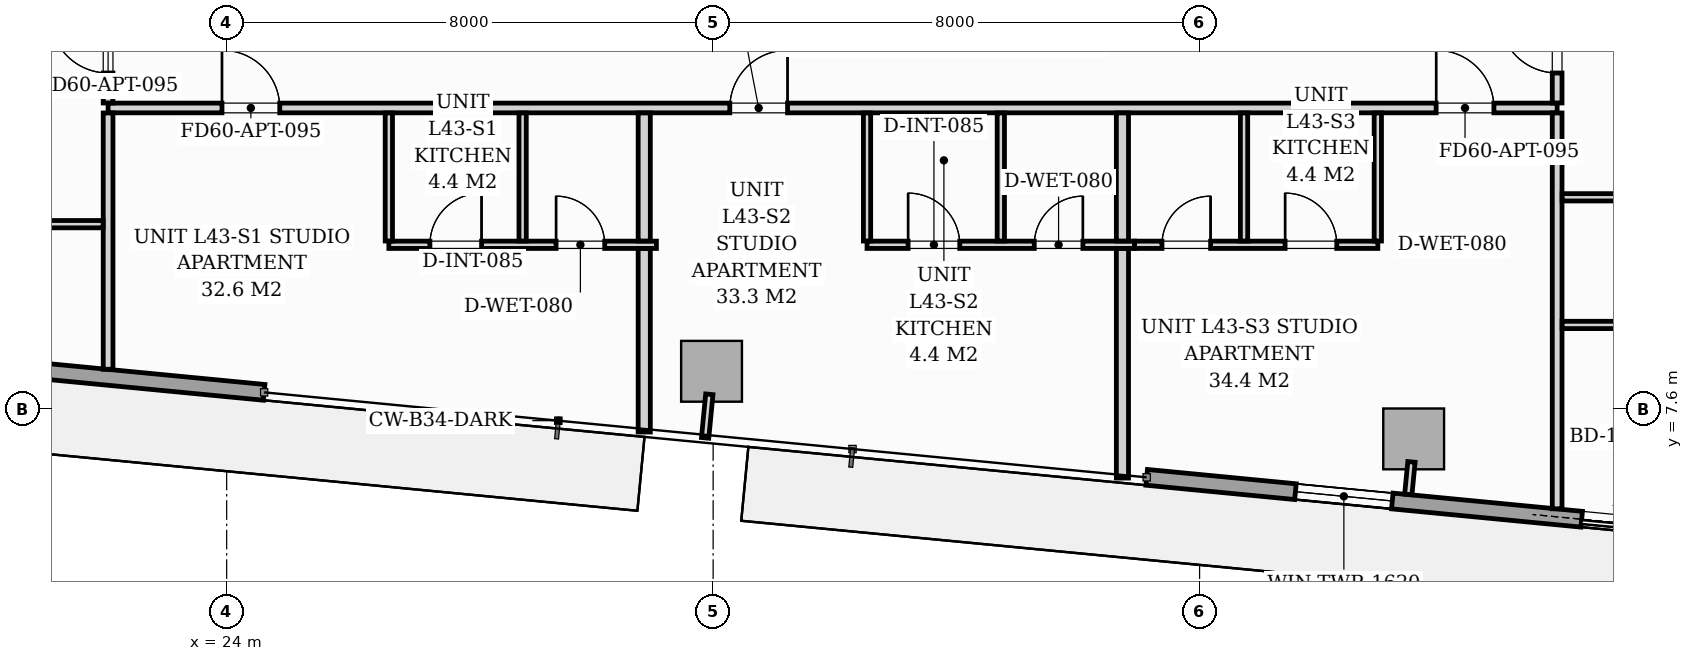
"""IFC4 building model, lengths in metres.
Left out: names, types, materials, properties, quantities, classifications, styles, units other than length and angle.
Written with IfcOpenShell. Run it as: python <this file> out.ifc"""

import sys

from ifc_helpers import new_model, si_unit, direction, frame, frame_2d, origin, origin_2d, place, context, subcontext, project, spatial, rectangle, extrude, source, transform, mapped, element, fill, save


model = new_model("IFC4")
c1 = context("Model", 3, precision=1e-05, world=origin(), true_north=direction((0.0, 1.0)))
c2 = subcontext(c1, "Body", "Model", "MODEL_VIEW")
j1 = project(units=[si_unit("LENGTHUNIT", "METRE"), si_unit("PLANEANGLEUNIT", "RADIAN")], contexts=[c1])
p1 = place(None, origin())
s1 = spatial("IfcSite", under=j1, at=p1, CompositionType="ELEMENT")
p2 = place(p1, origin())
s2 = spatial("IfcBuilding", under=s1, at=p2, CompositionType="ELEMENT")
p3 = place(p2, frame((0.0, 0.0, 150.2)))
s3 = spatial("IfcBuildingStorey", under=s2, at=p3, CompositionType="ELEMENT", Elevation=150.2)
m1 = source(origin(), c2, "Body", "SweptSolid", [
    extrude(rectangle(XDim=1.0, YDim=1.0, at=origin_2d()), origin(), (0.0, 0.0, 1.0), 3.196),
])
for number, where, z_axis, x_axis in (
    (1, (31.974, 8.22, 0.002), (0.0, 0.0, 1.0), (0.995, -0.096, 0.0)),
    (2, (43.521, 7.108, 0.002), (0.0, 0.0, 1.0), (0.995, -0.096, 0.0)),
):
    element("IfcColumn", number, at=place(p3, frame(where, z_axis=z_axis, x_axis=x_axis)), inside=s3, PredefinedType="COLUMN", context=c2, shape_type="MappedRepresentation", body=[
        mapped(m1, transform((0.0, 0.0, 0.0), scale=1.0)),
    ])
p4 = place(p3, frame((56.061, 4.845, 0.0), z_axis=(0.0, 0.0, 1.0), x_axis=(-0.995395976631, 0.095848055311, 0.0)))
e3 = element("IfcWall", 3, at=p4, inside=s3, PredefinedType="STANDARD", context=c2, shape_type="SweptSolid", body=[
    extrude(rectangle(XDim=17.01, YDim=0.26, at=frame_2d((8.505, 0.0))), origin(), (0.0, 0.0, 1.0), 2.94),
])
p5 = place(p4, frame((8.023, 0.0, 0.0)))
e4 = element("IfcOpeningElement", 4, at=p5, cuts=e3, PredefinedType="OPENING", context=c2, shape_type="SweptSolid", body=[
    extrude(rectangle(XDim=1.8, YDim=2.06, at=frame_2d((0.9, 1.03))), frame((0.0, 0.14, 0.0), z_axis=(0.0, -1.0, 0.0), x_axis=(1.0, 0.0, 0.0)), (0.0, 0.0, 1.0), 0.28),
])
p6 = place(p4, frame((2.05, 0.0, 0.65)))
e5 = element("IfcOpeningElement", 5, at=p6, cuts=e3, PredefinedType="OPENING", context=c2, shape_type="SweptSolid", body=[
    extrude(rectangle(XDim=1.6, YDim=1.5, at=frame_2d((0.8, 0.75))), frame((0.0, 0.14, 0.0), z_axis=(0.0, -1.0, 0.0), x_axis=(1.0, 0.0, 0.0)), (0.0, 0.0, 1.0), 0.28),
])
p7 = place(p4, frame((12.952, 0.0, 0.75)))
e6 = element("IfcOpeningElement", 6, at=p7, cuts=e3, PredefinedType="OPENING", context=c2, shape_type="SweptSolid", body=[
    extrude(rectangle(XDim=1.6, YDim=1.5, at=frame_2d((0.8, 0.75))), frame((0.0, 0.14, 0.0), z_axis=(0.0, -1.0, 0.0), x_axis=(1.0, 0.0, 0.0)), (0.0, 0.0, 1.0), 0.28),
])
p8 = place(p3, frame((24.617, 7.873, 0.0), z_axis=(0.0, 0.0, 1.0), x_axis=(-0.995395976631, 0.095848055311, 0.0)))
e7 = element("IfcWall", 7, at=p8, inside=s3, PredefinedType="STANDARD", context=c2, shape_type="SweptSolid", body=[
    extrude(rectangle(XDim=17.01, YDim=0.26, at=frame_2d((8.505, 0.0))), origin(), (0.0, 0.0, 1.0), 2.94),
])
p9 = place(p8, frame((6.65, 0.0, 0.0)))
e8 = element("IfcOpeningElement", 8, at=p9, cuts=e7, PredefinedType="OPENING", context=c2, shape_type="SweptSolid", body=[
    extrude(rectangle(XDim=1.8, YDim=2.06, at=frame_2d((0.9, 1.03))), frame((0.0, 0.14, 0.0), z_axis=(0.0, -1.0, 0.0), x_axis=(1.0, 0.0, 0.0)), (0.0, 0.0, 1.0), 0.28),
])
p10 = place(p8, frame((9.25, 0.0, 0.65)))
e9 = element("IfcOpeningElement", 9, at=p10, cuts=e7, PredefinedType="OPENING", context=c2, shape_type="SweptSolid", body=[
    extrude(rectangle(XDim=1.6, YDim=1.5, at=frame_2d((0.8, 0.75))), frame((0.0, 0.14, 0.0), z_axis=(0.0, -1.0, 0.0), x_axis=(1.0, 0.0, 0.0)), (0.0, 0.0, 1.0), 0.28),
])
p11 = place(p3, frame((22.05, 12.55, 0.0), z_axis=(0.0, 0.0, 1.0), x_axis=(1.0, 0.0, 0.0)))
e10 = element("IfcWall", 10, at=p11, inside=s3, PredefinedType="PARTITIONING", context=c2, shape_type="SweptSolid", body=[
    extrude(rectangle(XDim=23.83, YDim=0.16, at=frame_2d((11.915, 0.0))), origin(), (0.0, 0.0, 1.0), 2.94),
])
p12 = place(p11, frame((1.873, 0.0, 0.0)))
e11 = element("IfcOpeningElement", 11, at=p12, cuts=e10, PredefinedType="OPENING", context=c2, shape_type="SweptSolid", body=[
    extrude(rectangle(XDim=0.95, YDim=2.06, at=frame_2d((0.475, 1.03))), frame((0.0, 0.09, 0.0), z_axis=(0.0, -1.0, 0.0), x_axis=(1.0, 0.0, 0.0)), (0.0, 0.0, 1.0), 0.18),
])
p13 = place(p11, frame((10.224, 0.0, 0.0)))
e12 = element("IfcOpeningElement", 12, at=p13, cuts=e10, PredefinedType="OPENING", context=c2, shape_type="SweptSolid", body=[
    extrude(rectangle(XDim=0.95, YDim=2.06, at=frame_2d((0.475, 1.03))), frame((0.0, 0.09, 0.0), z_axis=(0.0, -1.0, 0.0), x_axis=(1.0, 0.0, 0.0)), (0.0, 0.0, 1.0), 0.18),
])
p14 = place(p11, frame((21.84, 0.0, 0.0)))
e13 = element("IfcOpeningElement", 13, at=p14, cuts=e10, PredefinedType="OPENING", context=c2, shape_type="SweptSolid", body=[
    extrude(rectangle(XDim=0.95, YDim=2.06, at=frame_2d((0.475, 1.03))), frame((0.0, 0.09, 0.0), z_axis=(0.0, -1.0, 0.0), x_axis=(1.0, 0.0, 0.0)), (0.0, 0.0, 1.0), 0.18),
])
p15 = place(p3, frame((22.05, 8.253, 0.0), z_axis=(0.0, 0.0, 1.0), x_axis=(0.0, 1.0, 0.0)))
e14 = element("IfcWall", 14, at=p15, inside=s3, PredefinedType="PARTITIONING", context=c2, shape_type="SweptSolid", body=[
    extrude(rectangle(XDim=4.215, YDim=0.16, at=frame_2d((2.107, 0.0))), origin(), (0.0, 0.0, 1.0), 2.94),
])
p16 = place(p3, frame((22.05, 12.632, 0.0), z_axis=(0.0, 0.0, 1.0), x_axis=(0.0, 1.0, 0.0)))
e15 = element("IfcWall", 15, at=p16, inside=s3, PredefinedType="PARTITIONING", context=c2, shape_type="SweptSolid", body=[
    extrude(rectangle(XDim=14.785, YDim=0.16, at=frame_2d((7.393, 0.0))), origin(), (0.0, 0.0, 1.0), 2.94),
])
p17 = place(p16, frame((0.493, 0.0, 0.0)))
e16 = element("IfcOpeningElement", 16, at=p17, cuts=e15, PredefinedType="OPENING", context=c2, shape_type="SweptSolid", body=[
    extrude(rectangle(XDim=0.95, YDim=2.06, at=frame_2d((0.475, 1.03))), frame((0.0, 0.09, 0.0), z_axis=(0.0, -1.0, 0.0), x_axis=(1.0, 0.0, 0.0)), (0.0, 0.0, 1.0), 0.18),
])
p18 = place(p3, frame((45.88, 5.958, 0.0), z_axis=(0.0, 0.0, 1.0), x_axis=(0.0, 1.0, 0.0)))
e17 = element("IfcWall", 17, at=p18, inside=s3, PredefinedType="PARTITIONING", context=c2, shape_type="SweptSolid", body=[
    extrude(rectangle(XDim=6.51, YDim=0.16, at=frame_2d((3.255, 0.0))), origin(), (0.0, 0.0, 1.0), 2.94),
])
p19 = place(p3, frame((45.88, 12.632, 0.0), z_axis=(0.0, 0.0, 1.0), x_axis=(0.0, 1.0, 0.0)))
e18 = element("IfcWall", 18, at=p19, inside=s3, PredefinedType="PARTITIONING", context=c2, shape_type="SweptSolid", body=[
    extrude(rectangle(XDim=4.466, YDim=0.16, at=frame_2d((2.233, 0.0))), origin(), (0.0, 0.0, 1.0), 2.94),
])
p20 = place(p19, frame((0.493, 0.0, 0.0)))
e19 = element("IfcOpeningElement", 19, at=p20, cuts=e18, PredefinedType="OPENING", context=c2, shape_type="SweptSolid", body=[
    extrude(rectangle(XDim=0.95, YDim=2.06, at=frame_2d((0.475, 1.03))), frame((0.0, 0.09, 0.0), z_axis=(0.0, -1.0, 0.0), x_axis=(1.0, 0.0, 0.0)), (0.0, 0.0, 1.0), 0.18),
])
p21 = place(p3, frame((26.667, 10.3, 0.0), z_axis=(0.0, 0.0, 1.0), x_axis=(1.0, 0.0, 0.0)))
e20 = element("IfcWall", 20, at=p21, inside=s3, PredefinedType="PARTITIONING", context=c2, shape_type="SweptSolid", body=[
    extrude(rectangle(XDim=4.4, YDim=0.12, at=frame_2d((2.2, 0.0))), origin(), (0.0, 0.0, 1.0), 2.94),
])
p22 = place(p21, frame((0.675, 0.0, 0.0)))
e21 = element("IfcOpeningElement", 21, at=p22, cuts=e20, PredefinedType="OPENING", context=c2, shape_type="SweptSolid", body=[
    extrude(rectangle(XDim=0.85, YDim=2.05, at=frame_2d((0.425, 1.025))), frame((0.0, 0.07, 0.0), z_axis=(0.0, -1.0, 0.0), x_axis=(1.0, 0.0, 0.0)), (0.0, 0.0, 1.0), 0.14),
])
p23 = place(p21, frame((2.75, 0.0, 0.0)))
e22 = element("IfcOpeningElement", 22, at=p23, cuts=e20, PredefinedType="OPENING", context=c2, shape_type="SweptSolid", body=[
    extrude(rectangle(XDim=0.8, YDim=2.02, at=frame_2d((0.4, 1.01))), frame((0.0, 0.07, 0.0), z_axis=(0.0, -1.0, 0.0), x_axis=(1.0, 0.0, 0.0)), (0.0, 0.0, 1.0), 0.14),
])
for number, where, z_axis, x_axis in (
    (23, (26.667, 10.362, 0.0), (0.0, 0.0, 1.0), (0.0, 1.0, 0.0)),
    (24, (28.867, 10.362, 0.0), (0.0, 0.0, 1.0), (0.0, 1.0, 0.0)),
):
    element("IfcWall", number, at=place(p3, frame(where, z_axis=z_axis, x_axis=x_axis)), inside=s3, PredefinedType="PARTITIONING", context=c2, shape_type="SweptSolid", body=[
        extrude(rectangle(XDim=2.106, YDim=0.12, at=frame_2d((1.053, 0.0))), origin(), (0.0, 0.0, 1.0), 2.94),
    ])
p24 = place(p3, frame((30.867, 7.221, 0.0), z_axis=(0.0, 0.0, 1.0), x_axis=(0.0, 1.0, 0.0)))
e25 = element("IfcWall", 25, at=p24, inside=s3, PredefinedType="PARTITIONING", context=c2, shape_type="SweptSolid", body=[
    extrude(rectangle(XDim=3.017, YDim=0.2, at=frame_2d((1.508, 0.0))), origin(), (0.0, 0.0, 1.0), 2.94),
])
p25 = place(p3, frame((30.867, 10.362, 0.0), z_axis=(0.0, 0.0, 1.0), x_axis=(0.0, 1.0, 0.0)))
e26 = element("IfcWall", 26, at=p25, inside=s3, PredefinedType="PARTITIONING", context=c2, shape_type="SweptSolid", body=[
    extrude(rectangle(XDim=2.106, YDim=0.2, at=frame_2d((1.053, 0.0))), origin(), (0.0, 0.0, 1.0), 2.94),
])
p26 = place(p3, frame((34.531, 10.3, 0.0), z_axis=(0.0, 0.0, 1.0), x_axis=(1.0, 0.0, 0.0)))
e27 = element("IfcWall", 27, at=p26, inside=s3, PredefinedType="PARTITIONING", context=c2, shape_type="SweptSolid", body=[
    extrude(rectangle(XDim=4.4, YDim=0.12, at=frame_2d((2.2, 0.0))), origin(), (0.0, 0.0, 1.0), 2.94),
])
p27 = place(p26, frame((0.675, 0.0, 0.0)))
e28 = element("IfcOpeningElement", 28, at=p27, cuts=e27, PredefinedType="OPENING", context=c2, shape_type="SweptSolid", body=[
    extrude(rectangle(XDim=0.85, YDim=2.05, at=frame_2d((0.425, 1.025))), frame((0.0, 0.07, 0.0), z_axis=(0.0, -1.0, 0.0), x_axis=(1.0, 0.0, 0.0)), (0.0, 0.0, 1.0), 0.14),
])
p28 = place(p26, frame((2.75, 0.0, 0.0)))
e29 = element("IfcOpeningElement", 29, at=p28, cuts=e27, PredefinedType="OPENING", context=c2, shape_type="SweptSolid", body=[
    extrude(rectangle(XDim=0.8, YDim=2.02, at=frame_2d((0.4, 1.01))), frame((0.0, 0.07, 0.0), z_axis=(0.0, -1.0, 0.0), x_axis=(1.0, 0.0, 0.0)), (0.0, 0.0, 1.0), 0.14),
])
for number, where, z_axis, x_axis in (
    (30, (34.531, 10.362, 0.0), (0.0, 0.0, 1.0), (0.0, 1.0, 0.0)),
    (31, (36.731, 10.362, 0.0), (0.0, 0.0, 1.0), (0.0, 1.0, 0.0)),
):
    element("IfcWall", number, at=place(p3, frame(where, z_axis=z_axis, x_axis=x_axis)), inside=s3, PredefinedType="PARTITIONING", context=c2, shape_type="SweptSolid", body=[
        extrude(rectangle(XDim=2.106, YDim=0.12, at=frame_2d((1.053, 0.0))), origin(), (0.0, 0.0, 1.0), 2.94),
    ])
p29 = place(p3, frame((38.731, 6.464, 0.0), z_axis=(0.0, 0.0, 1.0), x_axis=(0.0, 1.0, 0.0)))
e32 = element("IfcWall", 32, at=p29, inside=s3, PredefinedType="PARTITIONING", context=c2, shape_type="SweptSolid", body=[
    extrude(rectangle(XDim=3.774, YDim=0.2, at=frame_2d((1.887, 0.0))), origin(), (0.0, 0.0, 1.0), 2.94),
])
p30 = place(p3, frame((38.731, 10.362, 0.0), z_axis=(0.0, 0.0, 1.0), x_axis=(0.0, 1.0, 0.0)))
e33 = element("IfcWall", 33, at=p30, inside=s3, PredefinedType="PARTITIONING", context=c2, shape_type="SweptSolid", body=[
    extrude(rectangle(XDim=2.106, YDim=0.2, at=frame_2d((1.053, 0.0))), origin(), (0.0, 0.0, 1.0), 2.94),
])
p31 = place(p3, frame((38.931, 10.3, 0.0), z_axis=(0.0, 0.0, 1.0), x_axis=(1.0, 0.0, 0.0)))
e34 = element("IfcWall", 34, at=p31, inside=s3, PredefinedType="PARTITIONING", context=c2, shape_type="SweptSolid", body=[
    extrude(rectangle(XDim=4.0, YDim=0.12, at=frame_2d((2.0, 0.0))), origin(), (0.0, 0.0, 1.0), 2.94),
])
p32 = place(p31, frame((0.45, 0.0, 0.0)))
e35 = element("IfcOpeningElement", 35, at=p32, cuts=e34, PredefinedType="OPENING", context=c2, shape_type="SweptSolid", body=[
    extrude(rectangle(XDim=0.8, YDim=2.02, at=frame_2d((0.4, 1.01))), frame((0.0, 0.07, 0.0), z_axis=(0.0, -1.0, 0.0), x_axis=(1.0, 0.0, 0.0)), (0.0, 0.0, 1.0), 0.14),
])
p33 = place(p31, frame((2.475, 0.0, 0.0)))
e36 = element("IfcOpeningElement", 36, at=p33, cuts=e34, PredefinedType="OPENING", context=c2, shape_type="SweptSolid", body=[
    extrude(rectangle(XDim=0.85, YDim=2.05, at=frame_2d((0.425, 1.025))), frame((0.0, 0.07, 0.0), z_axis=(0.0, -1.0, 0.0), x_axis=(1.0, 0.0, 0.0)), (0.0, 0.0, 1.0), 0.14),
])
for number, where, z_axis, x_axis in (
    (37, (42.931, 10.362, 0.0), (0.0, 0.0, 1.0), (0.0, 1.0, 0.0)),
    (38, (40.731, 10.362, 0.0), (0.0, 0.0, 1.0), (0.0, 1.0, 0.0)),
):
    element("IfcWall", number, at=place(p3, frame(where, z_axis=z_axis, x_axis=x_axis)), inside=s3, PredefinedType="PARTITIONING", context=c2, shape_type="SweptSolid", body=[
        extrude(rectangle(XDim=2.106, YDim=0.12, at=frame_2d((1.053, 0.0))), origin(), (0.0, 0.0, 1.0), 2.94),
    ])
p34 = place(p3, frame((8.395, 10.639, 0.0), z_axis=(0.0, 0.0, 1.0), x_axis=(1.0, 0.0, 0.0)))
e39 = element("IfcWall", 39, at=p34, inside=s3, PredefinedType="PARTITIONING", context=c2, shape_type="SweptSolid", body=[
    extrude(rectangle(XDim=13.573, YDim=0.12, at=frame_2d((6.787, 0.0))), origin(), (0.0, 0.0, 1.0), 2.94),
])
p35 = place(p34, frame((7.451, 0.0, 0.0)))
e40 = element("IfcOpeningElement", 40, at=p35, cuts=e39, PredefinedType="OPENING", context=c2, shape_type="SweptSolid", body=[
    extrude(rectangle(XDim=0.85, YDim=2.05, at=frame_2d((0.425, 1.025))), frame((0.0, 0.07, 0.0), z_axis=(0.0, -1.0, 0.0), x_axis=(1.0, 0.0, 0.0)), (0.0, 0.0, 1.0), 0.14),
])
p36 = place(p3, frame((45.962, 8.982, 0.0), z_axis=(0.0, 0.0, 1.0), x_axis=(1.0, 0.0, 0.0)))
e41 = element("IfcWall", 41, at=p36, inside=s3, PredefinedType="PARTITIONING", context=c2, shape_type="SweptSolid", body=[
    extrude(rectangle(XDim=12.929, YDim=0.12, at=frame_2d((6.464, 0.0))), origin(), (0.0, 0.0, 1.0), 2.94),
])
p37 = place(p36, frame((4.441, 0.0, 0.0)))
e42 = element("IfcOpeningElement", 42, at=p37, cuts=e41, PredefinedType="OPENING", context=c2, shape_type="SweptSolid", body=[
    extrude(rectangle(XDim=0.85, YDim=2.05, at=frame_2d((0.425, 1.025))), frame((0.0, 0.07, 0.0), z_axis=(0.0, -1.0, 0.0), x_axis=(1.0, 0.0, 0.0)), (0.0, 0.0, 1.0), 0.14),
])
p38 = place(p3, frame((45.962, 11.081, 0.0), z_axis=(0.0, 0.0, 1.0), x_axis=(1.0, 0.0, 0.0)))
e43 = element("IfcWall", 43, at=p38, inside=s3, PredefinedType="PARTITIONING", context=c2, shape_type="SweptSolid", body=[
    extrude(rectangle(XDim=13.131, YDim=0.12, at=frame_2d((6.565, 0.0))), origin(), (0.0, 0.0, 1.0), 2.94),
])
p39 = place(p38, frame((4.441, 0.0, 0.0)))
e44 = element("IfcOpeningElement", 44, at=p39, cuts=e43, PredefinedType="OPENING", context=c2, shape_type="SweptSolid", body=[
    extrude(rectangle(XDim=0.85, YDim=2.05, at=frame_2d((0.425, 1.025))), frame((0.0, 0.07, 0.0), z_axis=(0.0, -1.0, 0.0), x_axis=(1.0, 0.0, 0.0)), (0.0, 0.0, 1.0), 0.14),
])
p40 = place(p3, frame((31.938, 7.841, 0.0), z_axis=(0.0, 0.0, 1.0), x_axis=(-0.095977354523, -0.995383517755, 0.0)))
e45 = element("IfcWall", 45, at=p40, inside=s3, PredefinedType="PARTITIONING", context=c2, shape_type="SweptSolid", body=[
    extrude(rectangle(XDim=0.72, YDim=0.12, at=frame_2d((0.36, 0.0))), origin(), (0.0, 0.0, 1.0), 2.94),
])
p41 = place(p3, frame((43.484, 6.729, 0.0), z_axis=(0.0, 0.0, 1.0), x_axis=(-0.095772948675, -0.995403205893, 0.0)))
e46 = element("IfcWall", 46, at=p41, inside=s3, PredefinedType="PARTITIONING", context=c2, shape_type="SweptSolid", body=[
    extrude(rectangle(XDim=0.538, YDim=0.12, at=frame_2d((0.269, 0.0))), origin(), (0.0, 0.0, 1.0), 2.94),
])
m2 = source(origin(), c2, "Body", "SweptSolid", [
    extrude(rectangle(XDim=1.8, YDim=2.06, at=frame_2d((0.9, 1.03))), frame((0.0, 0.025, 0.0), z_axis=(0.0, -1.0, 0.0), x_axis=(1.0, 0.0, 0.0)), (0.0, 0.0, 1.0), 0.05),
])
p42 = place(p5, origin())
e47 = element("IfcDoor", 47, at=p42, inside=s3, OperationType="SLIDING_TO_RIGHT", PredefinedType="DOOR", context=c2, shape_type="MappedRepresentation", body=[
    mapped(m2, transform((0.0, 0.0, 0.0), scale=1.0)),
])
fill(e4, e47)
m3 = source(origin(), c2, "Body", "SweptSolid", [
    extrude(rectangle(XDim=1.6, YDim=1.5, at=frame_2d((0.8, 0.75))), frame((0.0, 0.03, 0.0), z_axis=(0.0, -1.0, 0.0), x_axis=(1.0, 0.0, 0.0)), (0.0, 0.0, 1.0), 0.06),
])
p43 = place(p7, origin())
e48 = element("IfcWindow", 48, at=p43, inside=s3, PartitioningType="SINGLE_PANEL", PredefinedType="WINDOW", context=c2, shape_type="MappedRepresentation", body=[
    mapped(m3, transform((0.0, 0.0, 0.0), scale=1.0)),
])
fill(e6, e48)
m4 = source(origin(), c2, "Body", "SweptSolid", [
    extrude(rectangle(XDim=0.95, YDim=2.06, at=frame_2d((0.475, 1.03))), frame((0.0, 0.025, 0.0), z_axis=(0.0, -1.0, 0.0), x_axis=(1.0, 0.0, 0.0)), (0.0, 0.0, 1.0), 0.05),
])
p44 = place(p12, origin())
e49 = element("IfcDoor", 49, at=p44, inside=s3, OperationType="SINGLE_SWING_LEFT", PredefinedType="DOOR", context=c2, shape_type="MappedRepresentation", body=[
    mapped(m4, transform((0.0, 0.0, 0.0), scale=1.0)),
])
fill(e11, e49)
m5 = source(origin(), c2, "Body", "SweptSolid", [
    extrude(rectangle(XDim=0.85, YDim=2.05, at=frame_2d((0.425, 1.025))), frame((0.0, 0.025, 0.0), z_axis=(0.0, -1.0, 0.0), x_axis=(1.0, 0.0, 0.0)), (0.0, 0.0, 1.0), 0.05),
])
p45 = place(p22, origin())
e50 = element("IfcDoor", 50, at=p45, inside=s3, OperationType="SINGLE_SWING_RIGHT", PredefinedType="DOOR", context=c2, shape_type="MappedRepresentation", body=[
    mapped(m5, transform((0.0, 0.0, 0.0), scale=1.0)),
])
fill(e21, e50)
m6 = source(origin(), c2, "Body", "SweptSolid", [
    extrude(rectangle(XDim=0.8, YDim=2.02, at=frame_2d((0.4, 1.01))), frame((0.0, 0.025, 0.0), z_axis=(0.0, -1.0, 0.0), x_axis=(1.0, 0.0, 0.0)), (0.0, 0.0, 1.0), 0.05),
])
p46 = place(p23, origin())
e51 = element("IfcDoor", 51, at=p46, inside=s3, OperationType="SINGLE_SWING_LEFT", PredefinedType="DOOR", context=c2, shape_type="MappedRepresentation", body=[
    mapped(m6, transform((0.0, 0.0, 0.0), scale=1.0)),
])
fill(e22, e51)
p47 = place(p13, origin())
e52 = element("IfcDoor", 52, at=p47, inside=s3, OperationType="SINGLE_SWING_RIGHT", PredefinedType="DOOR", context=c2, shape_type="MappedRepresentation", body=[
    mapped(m4, transform((0.0, 0.0, 0.0), scale=1.0)),
])
fill(e12, e52)
p48 = place(p27, origin())
e53 = element("IfcDoor", 53, at=p48, inside=s3, OperationType="SINGLE_SWING_LEFT", PredefinedType="DOOR", context=c2, shape_type="MappedRepresentation", body=[
    mapped(m5, transform((0.0, 0.0, 0.0), scale=1.0)),
])
fill(e28, e53)
p49 = place(p28, origin())
e54 = element("IfcDoor", 54, at=p49, inside=s3, OperationType="SINGLE_SWING_RIGHT", PredefinedType="DOOR", context=c2, shape_type="MappedRepresentation", body=[
    mapped(m6, transform((0.0, 0.0, 0.0), scale=1.0)),
])
fill(e29, e54)
p50 = place(p14, origin())
e55 = element("IfcDoor", 55, at=p50, inside=s3, OperationType="SINGLE_SWING_LEFT", PredefinedType="DOOR", context=c2, shape_type="MappedRepresentation", body=[
    mapped(m4, transform((0.0, 0.0, 0.0), scale=1.0)),
])
fill(e13, e55)
p51 = place(p32, origin())
e56 = element("IfcDoor", 56, at=p51, inside=s3, OperationType="SINGLE_SWING_RIGHT", PredefinedType="DOOR", context=c2, shape_type="MappedRepresentation", body=[
    mapped(m6, transform((0.0, 0.0, 0.0), scale=1.0)),
])
fill(e35, e56)
p52 = place(p33, origin())
e57 = element("IfcDoor", 57, at=p52, inside=s3, OperationType="SINGLE_SWING_LEFT", PredefinedType="DOOR", context=c2, shape_type="MappedRepresentation", body=[
    mapped(m5, transform((0.0, 0.0, 0.0), scale=1.0)),
])
fill(e36, e57)
p53 = place(p17, origin())
e58 = element("IfcDoor", 58, at=p53, inside=s3, OperationType="SINGLE_SWING_RIGHT", PredefinedType="DOOR", context=c2, shape_type="MappedRepresentation", body=[
    mapped(m4, transform((0.0, 0.0, 0.0), scale=1.0)),
])
fill(e16, e58)
p54 = place(p20, origin())
e59 = element("IfcDoor", 59, at=p54, inside=s3, OperationType="SINGLE_SWING_RIGHT", PredefinedType="DOOR", context=c2, shape_type="MappedRepresentation", body=[
    mapped(m4, transform((0.0, 0.0, 0.0), scale=1.0)),
])
fill(e19, e59)
save(model, sys.argv[1])
